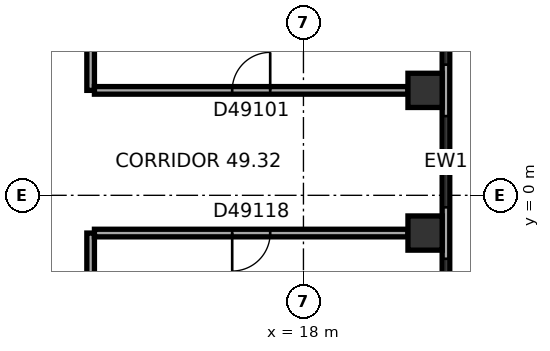
"""IFC4 building model, lengths in metres.
Left out: names, types, materials, properties, quantities, classifications, styles, units other than length and angle.
Written with IfcOpenShell. Run it as: python <this file> out.ifc"""

import sys

from ifc_helpers import new_model, si_unit, direction, frame, frame_2d, origin, origin_2d, place, context, subcontext, project, spatial, rectangle, extrude, element, fill, save


model = new_model("IFC4")
c1 = context("Model", 3, precision=1e-05, world=origin(), true_north=direction((0.0, 1.0)))
c2 = subcontext(c1, "Body", "Model", "MODEL_VIEW")
j1 = project(units=[si_unit("LENGTHUNIT", "METRE"), si_unit("PLANEANGLEUNIT", "RADIAN")], contexts=[c1])
p1 = place(None, origin())
s1 = spatial("IfcSite", under=j1, at=p1, CompositionType="ELEMENT")
p2 = place(p1, origin())
s2 = spatial("IfcBuilding", under=s1, at=p2, CompositionType="ELEMENT")
p3 = place(p2, frame((0.0, 0.0, 198.4)))
s3 = spatial("IfcBuildingStorey", under=s2, at=p3, CompositionType="ELEMENT", Elevation=198.4)
for number, where, z_axis, x_axis in (
    (1, (21.2, -0.993, 0.0), (0.0, 0.0, 1.0), (0.0, 1.0, 0.0)),
    (2, (21.2, 2.761, 0.0), (0.0, 0.0, 1.0), (0.0, 1.0, 0.0)),
):
    element("IfcColumn", number, at=place(p3, frame(where, z_axis=z_axis, x_axis=x_axis)), inside=s3, PredefinedType="COLUMN", context=c2, shape_type="SweptSolid", body=[
        extrude(rectangle(XDim=0.9, YDim=0.9, at=origin_2d()), origin(), (0.0, 0.0, 1.0), 3.7),
    ])
p4 = place(p3, frame((21.75, -9.138, 0.0), z_axis=(0.0, 0.0, 1.0), x_axis=(0.0, 1.0, 0.0)))
e3 = element("IfcWall", 3, at=p4, inside=s3, PredefinedType="STANDARD", context=c2, shape_type="SweptSolid", body=[
    extrude(rectangle(XDim=20.044, YDim=0.2, at=frame_2d((10.022, 0.0))), origin(), (0.0, 0.0, 1.0), 3.7),
])
p5 = place(p4, frame((1.314, 0.0, 0.9)))
e4 = element("IfcOpeningElement", 4, at=p5, cuts=e3, PredefinedType="OPENING", context=c2, shape_type="SweptSolid", body=[
    extrude(rectangle(XDim=2.4, YDim=2.0, at=frame_2d((1.2, 1.0))), frame((0.0, 0.11, 0.0), z_axis=(0.0, -1.0, 0.0), x_axis=(1.0, 0.0, 0.0)), (0.0, 0.0, 1.0), 0.22),
])
p6 = place(p4, frame((5.069, 0.0, 0.9)))
e5 = element("IfcOpeningElement", 5, at=p6, cuts=e3, PredefinedType="OPENING", context=c2, shape_type="SweptSolid", body=[
    extrude(rectangle(XDim=2.4, YDim=2.0, at=frame_2d((1.2, 1.0))), frame((0.0, 0.11, 0.0), z_axis=(0.0, -1.0, 0.0), x_axis=(1.0, 0.0, 0.0)), (0.0, 0.0, 1.0), 0.22),
])
p7 = place(p4, frame((8.823, 0.0, 0.9)))
e6 = element("IfcOpeningElement", 6, at=p7, cuts=e3, PredefinedType="OPENING", context=c2, shape_type="SweptSolid", body=[
    extrude(rectangle(XDim=2.4, YDim=2.0, at=frame_2d((1.2, 1.0))), frame((0.0, 0.11, 0.0), z_axis=(0.0, -1.0, 0.0), x_axis=(1.0, 0.0, 0.0)), (0.0, 0.0, 1.0), 0.22),
])
p8 = place(p4, frame((12.577, 0.0, 0.9)))
e7 = element("IfcOpeningElement", 7, at=p8, cuts=e3, PredefinedType="OPENING", context=c2, shape_type="SweptSolid", body=[
    extrude(rectangle(XDim=2.4, YDim=2.0, at=frame_2d((1.2, 1.0))), frame((0.0, 0.11, 0.0), z_axis=(0.0, -1.0, 0.0), x_axis=(1.0, 0.0, 0.0)), (0.0, 0.0, 1.0), 0.22),
])
p9 = place(p4, frame((16.331, 0.0, 0.9)))
e8 = element("IfcOpeningElement", 8, at=p9, cuts=e3, PredefinedType="OPENING", context=c2, shape_type="SweptSolid", body=[
    extrude(rectangle(XDim=2.4, YDim=2.0, at=frame_2d((1.2, 1.0))), frame((0.0, 0.11, 0.0), z_axis=(0.0, -1.0, 0.0), x_axis=(1.0, 0.0, 0.0)), (0.0, 0.0, 1.0), 0.22),
])
p10 = place(p3, frame((12.4, -5.812, 0.0), z_axis=(0.0, 0.0, 1.0), x_axis=(0.0, 1.0, 0.0)))
e9 = element("IfcWall", 9, at=p10, inside=s3, PredefinedType="PARTITIONING", context=c2, shape_type="SweptSolid", body=[
    extrude(rectangle(XDim=4.819, YDim=0.2, at=frame_2d((2.41, 0.0))), origin(), (0.0, 0.0, 1.0), 3.42),
])
p11 = place(p3, frame((12.4, 2.761, 0.0), z_axis=(0.0, 0.0, 1.0), x_axis=(0.0, 1.0, 0.0)))
e10 = element("IfcWall", 10, at=p11, inside=s3, PredefinedType="PARTITIONING", context=c2, shape_type="SweptSolid", body=[
    extrude(rectangle(XDim=3.301, YDim=0.2, at=frame_2d((1.65, 0.0))), origin(), (0.0, 0.0, 1.0), 3.42),
])
p12 = place(p3, frame((12.5, -0.993, 0.0), z_axis=(0.0, 0.0, 1.0), x_axis=(1.0, 0.0, 0.0)))
e11 = element("IfcWall", 11, at=p12, inside=s3, PredefinedType="PARTITIONING", context=c2, shape_type="SweptSolid", body=[
    extrude(rectangle(XDim=8.25, YDim=0.2, at=frame_2d((4.125, 0.0))), origin(), (0.0, 0.0, 1.0), 2.87),
])
p13 = place(p12, frame((3.625, 0.0, 0.0)))
e12 = element("IfcOpeningElement", 12, at=p13, cuts=e11, PredefinedType="OPENING", context=c2, shape_type="SweptSolid", body=[
    extrude(rectangle(XDim=1.0, YDim=2.1, at=frame_2d((0.5, 1.05))), frame((0.0, 0.11, 0.0), z_axis=(0.0, -1.0, 0.0), x_axis=(1.0, 0.0, 0.0)), (0.0, 0.0, 1.0), 0.22),
])
p14 = place(p3, frame((20.75, 2.761, 0.0), z_axis=(0.0, 0.0, 1.0), x_axis=(-1.0, 0.0, 0.0)))
e13 = element("IfcWall", 13, at=p14, inside=s3, PredefinedType="PARTITIONING", context=c2, shape_type="SweptSolid", body=[
    extrude(rectangle(XDim=8.25, YDim=0.2, at=frame_2d((4.125, 0.0))), origin(), (0.0, 0.0, 1.0), 3.42),
])
p15 = place(p14, frame((3.625, 0.0, 0.0)))
e14 = element("IfcOpeningElement", 14, at=p15, cuts=e13, PredefinedType="OPENING", context=c2, shape_type="SweptSolid", body=[
    extrude(rectangle(XDim=1.0, YDim=2.1, at=frame_2d((0.5, 1.05))), frame((0.0, 0.11, 0.0), z_axis=(0.0, -1.0, 0.0), x_axis=(1.0, 0.0, 0.0)), (0.0, 0.0, 1.0), 0.22),
])
p16 = place(p6, origin())
e15 = element("IfcWindow", 15, at=p16, inside=s3, PartitioningType="SINGLE_PANEL", PredefinedType="WINDOW", context=c2, shape_type="SweptSolid", body=[
    extrude(rectangle(XDim=2.4, YDim=2.0, at=frame_2d((1.2, 1.0))), frame((0.0, 0.03, 0.0), z_axis=(0.0, -1.0, 0.0), x_axis=(1.0, 0.0, 0.0)), (0.0, 0.0, 1.0), 0.06),
])
fill(e5, e15)
p17 = place(p7, origin())
e16 = element("IfcWindow", 16, at=p17, inside=s3, PartitioningType="SINGLE_PANEL", PredefinedType="WINDOW", context=c2, shape_type="SweptSolid", body=[
    extrude(rectangle(XDim=2.4, YDim=2.0, at=frame_2d((1.2, 1.0))), frame((0.0, 0.03, 0.0), z_axis=(0.0, -1.0, 0.0), x_axis=(1.0, 0.0, 0.0)), (0.0, 0.0, 1.0), 0.06),
])
fill(e6, e16)
p18 = place(p8, origin())
e17 = element("IfcWindow", 17, at=p18, inside=s3, PartitioningType="SINGLE_PANEL", PredefinedType="WINDOW", context=c2, shape_type="SweptSolid", body=[
    extrude(rectangle(XDim=2.4, YDim=2.0, at=frame_2d((1.2, 1.0))), frame((0.0, 0.03, 0.0), z_axis=(0.0, -1.0, 0.0), x_axis=(1.0, 0.0, 0.0)), (0.0, 0.0, 1.0), 0.06),
])
fill(e7, e17)
p19 = place(p15, origin())
e18 = element("IfcDoor", 18, at=p19, inside=s3, OperationType="SINGLE_SWING_LEFT", PredefinedType="DOOR", context=c2, shape_type="SweptSolid", body=[
    extrude(rectangle(XDim=1.0, YDim=2.1, at=frame_2d((0.5, 1.05))), frame((0.0, 0.025, 0.0), z_axis=(0.0, -1.0, 0.0), x_axis=(1.0, 0.0, 0.0)), (0.0, 0.0, 1.0), 0.05),
])
fill(e14, e18)
p20 = place(p13, origin())
e19 = element("IfcDoor", 19, at=p20, inside=s3, OperationType="SINGLE_SWING_LEFT", PredefinedType="DOOR", context=c2, shape_type="SweptSolid", body=[
    extrude(rectangle(XDim=1.0, YDim=2.1, at=frame_2d((0.5, 1.05))), frame((0.0, 0.025, 0.0), z_axis=(0.0, -1.0, 0.0), x_axis=(1.0, 0.0, 0.0)), (0.0, 0.0, 1.0), 0.05),
])
fill(e12, e19)
save(model, sys.argv[1])
